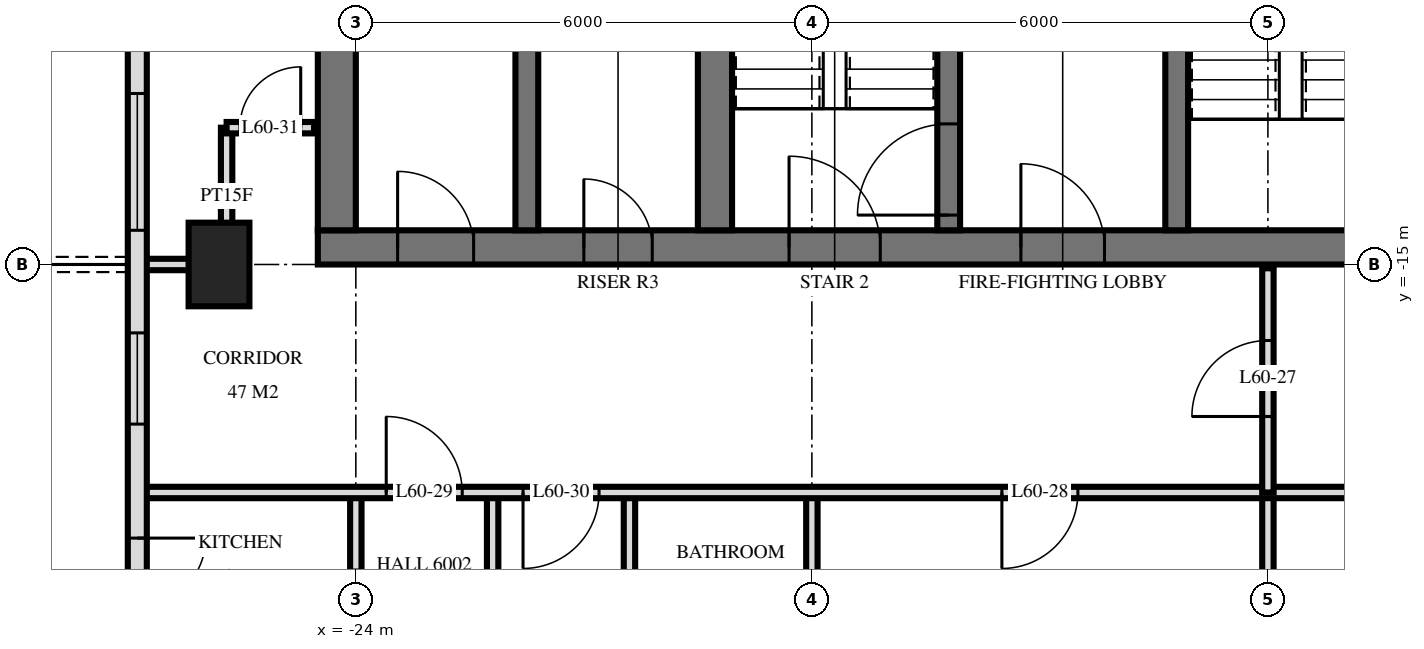
"""IFC4 building model, lengths in metres.
Left out: names, types, materials, properties, quantities, classifications, styles, units other than length and angle.
Written with IfcOpenShell. Run it as: python <this file> out.ifc"""

import sys

from ifc_helpers import new_model, si_unit, direction, frame, frame_2d, origin, origin_2d, place, context, subcontext, project, spatial, rectangle, extrude, element, fill, save


model = new_model("IFC4")
c1 = context("Model", 3, precision=1e-05, world=origin(), true_north=direction((0.0, 1.0)))
c2 = subcontext(c1, "Body", "Model", "MODEL_VIEW")
j1 = project(units=[si_unit("LENGTHUNIT", "METRE"), si_unit("PLANEANGLEUNIT", "RADIAN")], contexts=[c1])
p1 = place(None, origin())
s1 = spatial("IfcSite", under=j1, at=p1, CompositionType="ELEMENT")
p2 = place(p1, origin())
s2 = spatial("IfcBuilding", under=s1, at=p2, CompositionType="ELEMENT")
p3 = place(p2, frame((0.0, 0.0, 229.1)))
s3 = spatial("IfcBuildingStorey", under=s2, at=p3, CompositionType="ELEMENT", Elevation=229.1)
p4 = place(p3, frame((-25.8, -15.0, 0.0), z_axis=(0.0, 0.0, 1.0), x_axis=(0.0, 1.0, 0.0)))
e1 = element("IfcColumn", 1, at=p4, inside=s3, PredefinedType="COLUMN", context=c2, shape_type="SweptSolid", body=[
    extrude(rectangle(XDim=1.1, YDim=0.8, at=origin_2d()), origin(), (0.0, 0.0, 1.0), 3.5),
])
p5 = place(p3, frame((-24.5, -14.775, 0.0), z_axis=(0.0, 0.0, 1.0), x_axis=(1.0, 0.0, 0.0)))
e2 = element("IfcWall", 2, at=p5, inside=s3, PredefinedType="SHEAR", context=c2, shape_type="SweptSolid", body=[
    extrude(rectangle(XDim=14.5, YDim=0.45, at=frame_2d((7.25, 0.0))), origin(), (0.0, 0.0, 1.0), 3.5),
])
p6 = place(p5, frame((6.2, 0.0, 0.0)))
e3 = element("IfcOpeningElement", 3, at=p6, cuts=e2, PredefinedType="OPENING", context=c2, shape_type="SweptSolid", body=[
    extrude(rectangle(XDim=1.2, YDim=2.1, at=frame_2d((0.6, 1.05))), frame((0.0, 0.235, 0.0), z_axis=(0.0, -1.0, 0.0), x_axis=(1.0, 0.0, 0.0)), (0.0, 0.0, 1.0), 0.47),
])
p7 = place(p5, frame((9.25, 0.0, 0.0)))
e4 = element("IfcOpeningElement", 4, at=p7, cuts=e2, PredefinedType="OPENING", context=c2, shape_type="SweptSolid", body=[
    extrude(rectangle(XDim=1.1, YDim=2.1, at=frame_2d((0.55, 1.05))), frame((0.0, 0.235, 0.0), z_axis=(0.0, -1.0, 0.0), x_axis=(1.0, 0.0, 0.0)), (0.0, 0.0, 1.0), 0.47),
])
p8 = place(p5, frame((3.5, 0.0, 0.0)))
e5 = element("IfcOpeningElement", 5, at=p8, cuts=e2, PredefinedType="OPENING", context=c2, shape_type="SweptSolid", body=[
    extrude(rectangle(XDim=0.9, YDim=2.1, at=frame_2d((0.45, 1.05))), frame((0.0, 0.235, 0.0), z_axis=(0.0, -1.0, 0.0), x_axis=(1.0, 0.0, 0.0)), (0.0, 0.0, 1.0), 0.47),
])
p9 = place(p5, frame((1.05, 0.0, 0.0)))
e6 = element("IfcOpeningElement", 6, at=p9, cuts=e2, PredefinedType="OPENING", context=c2, shape_type="SweptSolid", body=[
    extrude(rectangle(XDim=1.0, YDim=2.1, at=frame_2d((0.5, 1.05))), frame((0.0, 0.235, 0.0), z_axis=(0.0, -1.0, 0.0), x_axis=(1.0, 0.0, 0.0)), (0.0, 0.0, 1.0), 0.47),
])
p10 = place(p3, frame((-24.25, -14.55, 0.0), z_axis=(0.0, 0.0, 1.0), x_axis=(0.0, 1.0, 0.0)))
e7 = element("IfcWall", 7, at=p10, inside=s3, PredefinedType="SHEAR", context=c2, shape_type="SweptSolid", body=[
    extrude(rectangle(XDim=14.1, YDim=0.5, at=frame_2d((7.05, 0.0))), origin(), (0.0, 0.0, 1.0), 3.5),
])
p11 = place(p3, frame((-13.2, -14.55, 0.0), z_axis=(0.0, 0.0, 1.0), x_axis=(0.0, 1.0, 0.0)))
e8 = element("IfcWall", 8, at=p11, inside=s3, PredefinedType="SHEAR", context=c2, shape_type="SweptSolid", body=[
    extrude(rectangle(XDim=5.4, YDim=0.3, at=frame_2d((2.7, 0.0))), origin(), (0.0, 0.0, 1.0), 3.5),
])
p12 = place(p11, frame((4.0, 0.0, 0.0)))
e9 = element("IfcOpeningElement", 9, at=p12, cuts=e8, PredefinedType="OPENING", context=c2, shape_type="SweptSolid", body=[
    extrude(rectangle(XDim=1.2, YDim=2.1, at=frame_2d((0.6, 1.05))), frame((0.0, 0.16, 0.0), z_axis=(0.0, -1.0, 0.0), x_axis=(1.0, 0.0, 0.0)), (0.0, 0.0, 1.0), 0.32),
])
p13 = place(p3, frame((-16.2, -14.55, 0.0), z_axis=(0.0, 0.0, 1.0), x_axis=(0.0, 1.0, 0.0)))
e10 = element("IfcWall", 10, at=p13, inside=s3, PredefinedType="SHEAR", context=c2, shape_type="SweptSolid", body=[
    extrude(rectangle(XDim=5.4, YDim=0.3, at=frame_2d((2.7, 0.0))), origin(), (0.0, 0.0, 1.0), 3.5),
])
p14 = place(p13, frame((0.2, 0.0, 0.0)))
e11 = element("IfcOpeningElement", 11, at=p14, cuts=e10, PredefinedType="OPENING", context=c2, shape_type="SweptSolid", body=[
    extrude(rectangle(XDim=1.2, YDim=2.1, at=frame_2d((0.6, 1.05))), frame((0.0, 0.16, 0.0), z_axis=(0.0, -1.0, 0.0), x_axis=(1.0, 0.0, 0.0)), (0.0, 0.0, 1.0), 0.32),
])
p15 = place(p3, frame((-19.275, -14.55, 0.0), z_axis=(0.0, 0.0, 1.0), x_axis=(0.0, 1.0, 0.0)))
e12 = element("IfcWall", 12, at=p15, inside=s3, PredefinedType="SHEAR", context=c2, shape_type="SweptSolid", body=[
    extrude(rectangle(XDim=5.4, YDim=0.45, at=frame_2d((2.7, 0.0))), origin(), (0.0, 0.0, 1.0), 3.5),
])
p16 = place(p3, frame((-21.75, -14.55, 0.0), z_axis=(0.0, 0.0, 1.0), x_axis=(0.0, 1.0, 0.0)))
e13 = element("IfcWall", 13, at=p16, inside=s3, PredefinedType="SHEAR", context=c2, shape_type="SweptSolid", body=[
    extrude(rectangle(XDim=5.4, YDim=0.3, at=frame_2d((2.7, 0.0))), origin(), (0.0, 0.0, 1.0), 3.5),
])
p17 = place(p3, frame((-26.875, -3.325, 0.0), z_axis=(0.0, 0.0, 1.0), x_axis=(0.0, -1.0, 0.0)))
e14 = element("IfcWall", 14, at=p17, inside=s3, PredefinedType="SOLIDWALL", context=c2, shape_type="SweptSolid", body=[
    extrude(rectangle(XDim=21.551, YDim=0.25, at=frame_2d((10.775, 0.0))), origin(), (0.0, 0.0, 1.0), 3.22),
])
p18 = place(p17, frame((6.575, 0.0, 0.0)))
e15 = element("IfcOpeningElement", 15, at=p18, cuts=e14, PredefinedType="OPENING", context=c2, shape_type="SweptSolid", body=[
    extrude(rectangle(XDim=1.8, YDim=2.4, at=frame_2d((0.9, 1.2))), frame((0.0, 0.135, 0.0), z_axis=(0.0, -1.0, 0.0), x_axis=(1.0, 0.0, 0.0)), (0.0, 0.0, 1.0), 0.27),
])
p19 = place(p17, frame((9.425, 0.0, 0.9)))
e16 = element("IfcOpeningElement", 16, at=p19, cuts=e14, PredefinedType="OPENING", context=c2, shape_type="SweptSolid", body=[
    extrude(rectangle(XDim=1.8, YDim=1.5, at=frame_2d((0.9, 0.75))), frame((0.0, 0.135, 0.0), z_axis=(0.0, -1.0, 0.0), x_axis=(1.0, 0.0, 0.0)), (0.0, 0.0, 1.0), 0.27),
])
p20 = place(p17, frame((12.575, 0.0, 0.9)))
e17 = element("IfcOpeningElement", 17, at=p20, cuts=e14, PredefinedType="OPENING", context=c2, shape_type="SweptSolid", body=[
    extrude(rectangle(XDim=1.2, YDim=1.5, at=frame_2d((0.6, 0.75))), frame((0.0, 0.135, 0.0), z_axis=(0.0, -1.0, 0.0), x_axis=(1.0, 0.0, 0.0)), (0.0, 0.0, 1.0), 0.27),
])
p21 = place(p17, frame((15.275, 0.0, 0.0)))
e18 = element("IfcOpeningElement", 18, at=p21, cuts=e14, PredefinedType="OPENING", context=c2, shape_type="SweptSolid", body=[
    extrude(rectangle(XDim=1.8, YDim=2.4, at=frame_2d((0.9, 1.2))), frame((0.0, 0.135, 0.0), z_axis=(0.0, -1.0, 0.0), x_axis=(1.0, 0.0, 0.0)), (0.0, 0.0, 1.0), 0.27),
])
p22 = place(p17, frame((18.875, 0.0, 0.0)))
e19 = element("IfcOpeningElement", 19, at=p22, cuts=e14, PredefinedType="OPENING", context=c2, shape_type="SweptSolid", body=[
    extrude(rectangle(XDim=1.8, YDim=2.4, at=frame_2d((0.9, 1.2))), frame((0.0, 0.135, 0.0), z_axis=(0.0, -1.0, 0.0), x_axis=(1.0, 0.0, 0.0)), (0.0, 0.0, 1.0), 0.27),
])
p23 = place(p3, frame((-12.0, -18.0, 0.0), z_axis=(0.0, 0.0, 1.0), x_axis=(0.0, 1.0, 0.0)))
e20 = element("IfcWall", 20, at=p23, inside=s3, PredefinedType="PARTITIONING", context=c2, shape_type="SweptSolid", body=[
    extrude(rectangle(XDim=2.95, YDim=0.15, at=frame_2d((1.475, 0.0))), origin(), (0.0, 0.0, 1.0), 3.22),
])
p24 = place(p23, frame((1.0, 0.0, 0.0)))
e21 = element("IfcOpeningElement", 21, at=p24, cuts=e20, PredefinedType="OPENING", context=c2, shape_type="SweptSolid", body=[
    extrude(rectangle(XDim=1.0, YDim=2.1, at=frame_2d((0.5, 1.05))), frame((0.0, 0.085, 0.0), z_axis=(0.0, -1.0, 0.0), x_axis=(1.0, 0.0, 0.0)), (0.0, 0.0, 1.0), 0.17),
])
for number, where, z_axis, x_axis in (
    (22, (-12.0, -29.22, 0.0), (0.0, 0.0, 1.0), (0.0, 1.0, 0.0)),
    (23, (-18.0, -29.22, 0.0), (0.0, 0.0, 1.0), (0.0, 1.0, 0.0)),
):
    element("IfcWall", number, at=place(p3, frame(where, z_axis=z_axis, x_axis=x_axis)), inside=s3, PredefinedType="PARTITIONING", context=c2, shape_type="SweptSolid", body=[
        extrude(rectangle(XDim=11.22, YDim=0.15, at=frame_2d((5.61, 0.0))), origin(), (0.0, 0.0, 1.0), 3.22),
    ])
for number, where, z_axis, x_axis in (
    (24, (-20.4, -21.0, 0.0), (0.0, 0.0, 1.0), (0.0, 1.0, 0.0)),
    (25, (-22.2, -21.0, 0.0), (0.0, 0.0, 1.0), (0.0, 1.0, 0.0)),
):
    element("IfcWall", number, at=place(p3, frame(where, z_axis=z_axis, x_axis=x_axis)), inside=s3, PredefinedType="PARTITIONING", context=c2, shape_type="SweptSolid", body=[
        extrude(rectangle(XDim=3.0, YDim=0.15, at=frame_2d((1.5, 0.0))), origin(), (0.0, 0.0, 1.0), 3.22),
    ])
p25 = place(p3, frame((-24.0, -21.0, 0.0), z_axis=(0.0, 0.0, 1.0), x_axis=(0.0, 1.0, 0.0)))
e26 = element("IfcWall", 26, at=p25, inside=s3, PredefinedType="PARTITIONING", context=c2, shape_type="SweptSolid", body=[
    extrude(rectangle(XDim=3.0, YDim=0.15, at=frame_2d((1.5, 0.0))), origin(), (0.0, 0.0, 1.0), 3.22),
])
p26 = place(p25, frame((0.98, 0.0, 0.0)))
e27 = element("IfcOpeningElement", 27, at=p26, cuts=e26, PredefinedType="OPENING", context=c2, shape_type="SweptSolid", body=[
    extrude(rectangle(XDim=1.0, YDim=2.1, at=frame_2d((0.5, 1.05))), frame((0.0, 0.085, 0.0), z_axis=(0.0, -1.0, 0.0), x_axis=(1.0, 0.0, 0.0)), (0.0, 0.0, 1.0), 0.17),
])
p27 = place(p3, frame((-25.7, -15.0, 0.0), z_axis=(0.0, 0.0, 1.0), x_axis=(0.0, 1.0, 0.0)))
e28 = element("IfcWall", 28, at=p27, inside=s3, PredefinedType="PARTITIONING", context=c2, shape_type="SweptSolid", body=[
    extrude(rectangle(XDim=1.8, YDim=0.15, at=frame_2d((0.9, 0.0))), origin(), (0.0, 0.0, 1.0), 3.22),
])
p28 = place(p3, frame((-26.82, -18.0, 0.0), z_axis=(0.0, 0.0, 1.0), x_axis=(1.0, 0.0, 0.0)))
e29 = element("IfcWall", 29, at=p28, inside=s3, PredefinedType="PARTITIONING", context=c2, shape_type="SweptSolid", body=[
    extrude(rectangle(XDim=53.64, YDim=0.15, at=frame_2d((26.82, 0.0))), origin(), (0.0, 0.0, 1.0), 3.22),
])
p29 = place(p28, frame((11.32, 0.0, 0.0)))
e30 = element("IfcOpeningElement", 30, at=p29, cuts=e29, PredefinedType="OPENING", context=c2, shape_type="SweptSolid", body=[
    extrude(rectangle(XDim=1.0, YDim=2.1, at=frame_2d((0.5, 1.05))), frame((0.0, 0.085, 0.0), z_axis=(0.0, -1.0, 0.0), x_axis=(1.0, 0.0, 0.0)), (0.0, 0.0, 1.0), 0.17),
])
p30 = place(p28, frame((3.22, 0.0, 0.0)))
e31 = element("IfcOpeningElement", 31, at=p30, cuts=e29, PredefinedType="OPENING", context=c2, shape_type="SweptSolid", body=[
    extrude(rectangle(XDim=1.0, YDim=2.1, at=frame_2d((0.5, 1.05))), frame((0.0, 0.085, 0.0), z_axis=(0.0, -1.0, 0.0), x_axis=(1.0, 0.0, 0.0)), (0.0, 0.0, 1.0), 0.17),
])
p31 = place(p28, frame((5.02, 0.0, 0.0)))
e32 = element("IfcOpeningElement", 32, at=p31, cuts=e29, PredefinedType="OPENING", context=c2, shape_type="SweptSolid", body=[
    extrude(rectangle(XDim=1.0, YDim=2.1, at=frame_2d((0.5, 1.05))), frame((0.0, 0.085, 0.0), z_axis=(0.0, -1.0, 0.0), x_axis=(1.0, 0.0, 0.0)), (0.0, 0.0, 1.0), 0.17),
])
p32 = place(p28, frame((38.97, 0.0, 0.0)))
e33 = element("IfcOpeningElement", 33, at=p32, cuts=e29, PredefinedType="OPENING", context=c2, shape_type="SweptSolid", body=[
    extrude(rectangle(XDim=1.0, YDim=2.1, at=frame_2d((0.5, 1.05))), frame((0.0, 0.085, 0.0), z_axis=(0.0, -1.0, 0.0), x_axis=(1.0, 0.0, 0.0)), (0.0, 0.0, 1.0), 0.17),
])
p33 = place(p28, frame((48.72, 0.0, 0.0)))
e34 = element("IfcOpeningElement", 34, at=p33, cuts=e29, PredefinedType="OPENING", context=c2, shape_type="SweptSolid", body=[
    extrude(rectangle(XDim=1.0, YDim=2.1, at=frame_2d((0.5, 1.05))), frame((0.0, 0.085, 0.0), z_axis=(0.0, -1.0, 0.0), x_axis=(1.0, 0.0, 0.0)), (0.0, 0.0, 1.0), 0.17),
])
p34 = place(p28, frame((46.92, 0.0, 0.0)))
e35 = element("IfcOpeningElement", 35, at=p34, cuts=e29, PredefinedType="OPENING", context=c2, shape_type="SweptSolid", body=[
    extrude(rectangle(XDim=1.0, YDim=2.1, at=frame_2d((0.5, 1.05))), frame((0.0, 0.085, 0.0), z_axis=(0.0, -1.0, 0.0), x_axis=(1.0, 0.0, 0.0)), (0.0, 0.0, 1.0), 0.17),
])
p35 = place(p28, frame((18.82, 0.0, 0.0)))
e36 = element("IfcOpeningElement", 36, at=p35, cuts=e29, PredefinedType="OPENING", context=c2, shape_type="SweptSolid", body=[
    extrude(rectangle(XDim=1.0, YDim=2.1, at=frame_2d((0.5, 1.05))), frame((0.0, 0.085, 0.0), z_axis=(0.0, -1.0, 0.0), x_axis=(1.0, 0.0, 0.0)), (0.0, 0.0, 1.0), 0.17),
])
p36 = place(p28, frame((27.82, 0.0, 0.0)))
e37 = element("IfcOpeningElement", 37, at=p36, cuts=e29, PredefinedType="OPENING", context=c2, shape_type="SweptSolid", body=[
    extrude(rectangle(XDim=1.0, YDim=2.1, at=frame_2d((0.5, 1.05))), frame((0.0, 0.085, 0.0), z_axis=(0.0, -1.0, 0.0), x_axis=(1.0, 0.0, 0.0)), (0.0, 0.0, 1.0), 0.17),
])
p37 = place(p28, frame((35.32, 0.0, 0.0)))
e38 = element("IfcOpeningElement", 38, at=p37, cuts=e29, PredefinedType="OPENING", context=c2, shape_type="SweptSolid", body=[
    extrude(rectangle(XDim=1.0, YDim=2.1, at=frame_2d((0.5, 1.05))), frame((0.0, 0.085, 0.0), z_axis=(0.0, -1.0, 0.0), x_axis=(1.0, 0.0, 0.0)), (0.0, 0.0, 1.0), 0.17),
])
p38 = place(p3, frame((-26.82, -15.0, 0.0), z_axis=(0.0, 0.0, 1.0), x_axis=(1.0, 0.0, 0.0)))
e39 = element("IfcWall", 39, at=p38, inside=s3, PredefinedType="PARTITIONING", context=c2, shape_type="SweptSolid", body=[
    extrude(rectangle(XDim=1.12, YDim=0.15, at=frame_2d((0.56, 0.0))), origin(), (0.0, 0.0, 1.0), 3.22),
])
p39 = place(p3, frame((-25.7, -13.2, 0.0), z_axis=(0.0, 0.0, 1.0), x_axis=(1.0, 0.0, 0.0)))
e40 = element("IfcWall", 40, at=p39, inside=s3, PredefinedType="PARTITIONING", context=c2, shape_type="SweptSolid", body=[
    extrude(rectangle(XDim=1.15, YDim=0.15, at=frame_2d((0.575, 0.0))), origin(), (0.0, 0.0, 1.0), 3.22),
])
p40 = place(p39, frame((0.175, 0.0, 0.0)))
e41 = element("IfcOpeningElement", 41, at=p40, cuts=e40, PredefinedType="OPENING", context=c2, shape_type="SweptSolid", body=[
    extrude(rectangle(XDim=0.8, YDim=2.1, at=frame_2d((0.4, 1.05))), frame((0.0, 0.085, 0.0), z_axis=(0.0, -1.0, 0.0), x_axis=(1.0, 0.0, 0.0)), (0.0, 0.0, 1.0), 0.17),
])
p41 = place(p19, origin())
e42 = element("IfcWindow", 42, at=p41, inside=s3, PartitioningType="SINGLE_PANEL", PredefinedType="WINDOW", context=c2, shape_type="SweptSolid", body=[
    extrude(rectangle(XDim=1.8, YDim=1.5, at=frame_2d((0.9, 0.75))), frame((0.0, 0.03, 0.0), z_axis=(0.0, -1.0, 0.0), x_axis=(1.0, 0.0, 0.0)), (0.0, 0.0, 1.0), 0.06),
])
fill(e16, e42)
p42 = place(p20, origin())
e43 = element("IfcWindow", 43, at=p42, inside=s3, PartitioningType="SINGLE_PANEL", PredefinedType="WINDOW", context=c2, shape_type="SweptSolid", body=[
    extrude(rectangle(XDim=1.2, YDim=1.5, at=frame_2d((0.6, 0.75))), frame((0.0, 0.03, 0.0), z_axis=(0.0, -1.0, 0.0), x_axis=(1.0, 0.0, 0.0)), (0.0, 0.0, 1.0), 0.06),
])
fill(e17, e43)
p43 = place(p21, origin())
e44 = element("IfcDoor", 44, at=p43, inside=s3, OperationType="DOUBLE_DOOR_SINGLE_SWING", PredefinedType="DOOR", context=c2, shape_type="SweptSolid", body=[
    extrude(rectangle(XDim=1.8, YDim=2.4, at=frame_2d((0.9, 1.2))), frame((0.0, 0.025, 0.0), z_axis=(0.0, -1.0, 0.0), x_axis=(1.0, 0.0, 0.0)), (0.0, 0.0, 1.0), 0.05),
])
fill(e18, e44)
p44 = place(p6, origin())
e45 = element("IfcDoor", 45, at=p44, inside=s3, OperationType="SINGLE_SWING_RIGHT", PredefinedType="DOOR", context=c2, shape_type="SweptSolid", body=[
    extrude(rectangle(XDim=1.2, YDim=2.1, at=frame_2d((0.6, 1.05))), frame((0.0, 0.025, 0.0), z_axis=(0.0, -1.0, 0.0), x_axis=(1.0, 0.0, 0.0)), (0.0, 0.0, 1.0), 0.05),
])
fill(e3, e45)
p45 = place(p7, origin())
e46 = element("IfcDoor", 46, at=p45, inside=s3, OperationType="SINGLE_SWING_RIGHT", PredefinedType="DOOR", context=c2, shape_type="SweptSolid", body=[
    extrude(rectangle(XDim=1.1, YDim=2.1, at=frame_2d((0.55, 1.05))), frame((0.0, 0.025, 0.0), z_axis=(0.0, -1.0, 0.0), x_axis=(1.0, 0.0, 0.0)), (0.0, 0.0, 1.0), 0.05),
])
fill(e4, e46)
p46 = place(p8, origin())
e47 = element("IfcDoor", 47, at=p46, inside=s3, OperationType="SINGLE_SWING_RIGHT", PredefinedType="DOOR", context=c2, shape_type="SweptSolid", body=[
    extrude(rectangle(XDim=0.9, YDim=2.1, at=frame_2d((0.45, 1.05))), frame((0.0, 0.025, 0.0), z_axis=(0.0, -1.0, 0.0), x_axis=(1.0, 0.0, 0.0)), (0.0, 0.0, 1.0), 0.05),
])
fill(e5, e47)
p47 = place(p9, origin())
e48 = element("IfcDoor", 48, at=p47, inside=s3, OperationType="SINGLE_SWING_RIGHT", PredefinedType="DOOR", context=c2, shape_type="SweptSolid", body=[
    extrude(rectangle(XDim=1.0, YDim=2.1, at=frame_2d((0.5, 1.05))), frame((0.0, 0.025, 0.0), z_axis=(0.0, -1.0, 0.0), x_axis=(1.0, 0.0, 0.0)), (0.0, 0.0, 1.0), 0.05),
])
fill(e6, e48)
p48 = place(p14, origin())
e49 = element("IfcDoor", 49, at=p48, inside=s3, OperationType="SINGLE_SWING_RIGHT", PredefinedType="DOOR", context=c2, shape_type="SweptSolid", body=[
    extrude(rectangle(XDim=1.2, YDim=2.1, at=frame_2d((0.6, 1.05))), frame((0.0, 0.025, 0.0), z_axis=(0.0, -1.0, 0.0), x_axis=(1.0, 0.0, 0.0)), (0.0, 0.0, 1.0), 0.05),
])
fill(e11, e49)
p49 = place(p24, origin())
e50 = element("IfcDoor", 50, at=p49, inside=s3, OperationType="SINGLE_SWING_RIGHT", PredefinedType="DOOR", context=c2, shape_type="SweptSolid", body=[
    extrude(rectangle(XDim=1.0, YDim=2.1, at=frame_2d((0.5, 1.05))), frame((0.0, 0.025, 0.0), z_axis=(0.0, -1.0, 0.0), x_axis=(1.0, 0.0, 0.0)), (0.0, 0.0, 1.0), 0.05),
])
fill(e21, e50)
p50 = place(p29, frame((0.5, 0.0, 0.0), z_axis=(0.0, 0.0, 1.0), x_axis=(-1.0, 0.0, 0.0)))
e51 = element("IfcDoor", 51, at=p50, inside=s3, OperationType="SINGLE_SWING_LEFT", PredefinedType="DOOR", context=c2, shape_type="SweptSolid", body=[
    extrude(rectangle(XDim=1.0, YDim=2.1, at=frame_2d((0.0, 1.05))), frame((0.0, -0.025, 0.0), z_axis=(0.0, 1.0, 0.0), x_axis=(-1.0, 0.0, 0.0)), (0.0, 0.0, 1.0), 0.05),
])
fill(e30, e51)
p51 = place(p30, origin())
e52 = element("IfcDoor", 52, at=p51, inside=s3, OperationType="SINGLE_SWING_RIGHT", PredefinedType="DOOR", context=c2, shape_type="SweptSolid", body=[
    extrude(rectangle(XDim=1.0, YDim=2.1, at=frame_2d((0.5, 1.05))), frame((0.0, 0.025, 0.0), z_axis=(0.0, -1.0, 0.0), x_axis=(1.0, 0.0, 0.0)), (0.0, 0.0, 1.0), 0.05),
])
fill(e31, e52)
p52 = place(p31, frame((0.5, 0.0, 0.0), z_axis=(0.0, 0.0, 1.0), x_axis=(-1.0, 0.0, 0.0)))
e53 = element("IfcDoor", 53, at=p52, inside=s3, OperationType="SINGLE_SWING_LEFT", PredefinedType="DOOR", context=c2, shape_type="SweptSolid", body=[
    extrude(rectangle(XDim=1.0, YDim=2.1, at=frame_2d((0.0, 1.05))), frame((0.0, -0.025, 0.0), z_axis=(0.0, 1.0, 0.0), x_axis=(-1.0, 0.0, 0.0)), (0.0, 0.0, 1.0), 0.05),
])
fill(e32, e53)
p53 = place(p40, origin())
e54 = element("IfcDoor", 54, at=p53, inside=s3, OperationType="SINGLE_SWING_LEFT", PredefinedType="DOOR", context=c2, shape_type="SweptSolid", body=[
    extrude(rectangle(XDim=0.8, YDim=2.1, at=frame_2d((0.4, 1.05))), frame((0.0, 0.025, 0.0), z_axis=(0.0, -1.0, 0.0), x_axis=(1.0, 0.0, 0.0)), (0.0, 0.0, 1.0), 0.05),
])
fill(e41, e54)
save(model, sys.argv[1])
